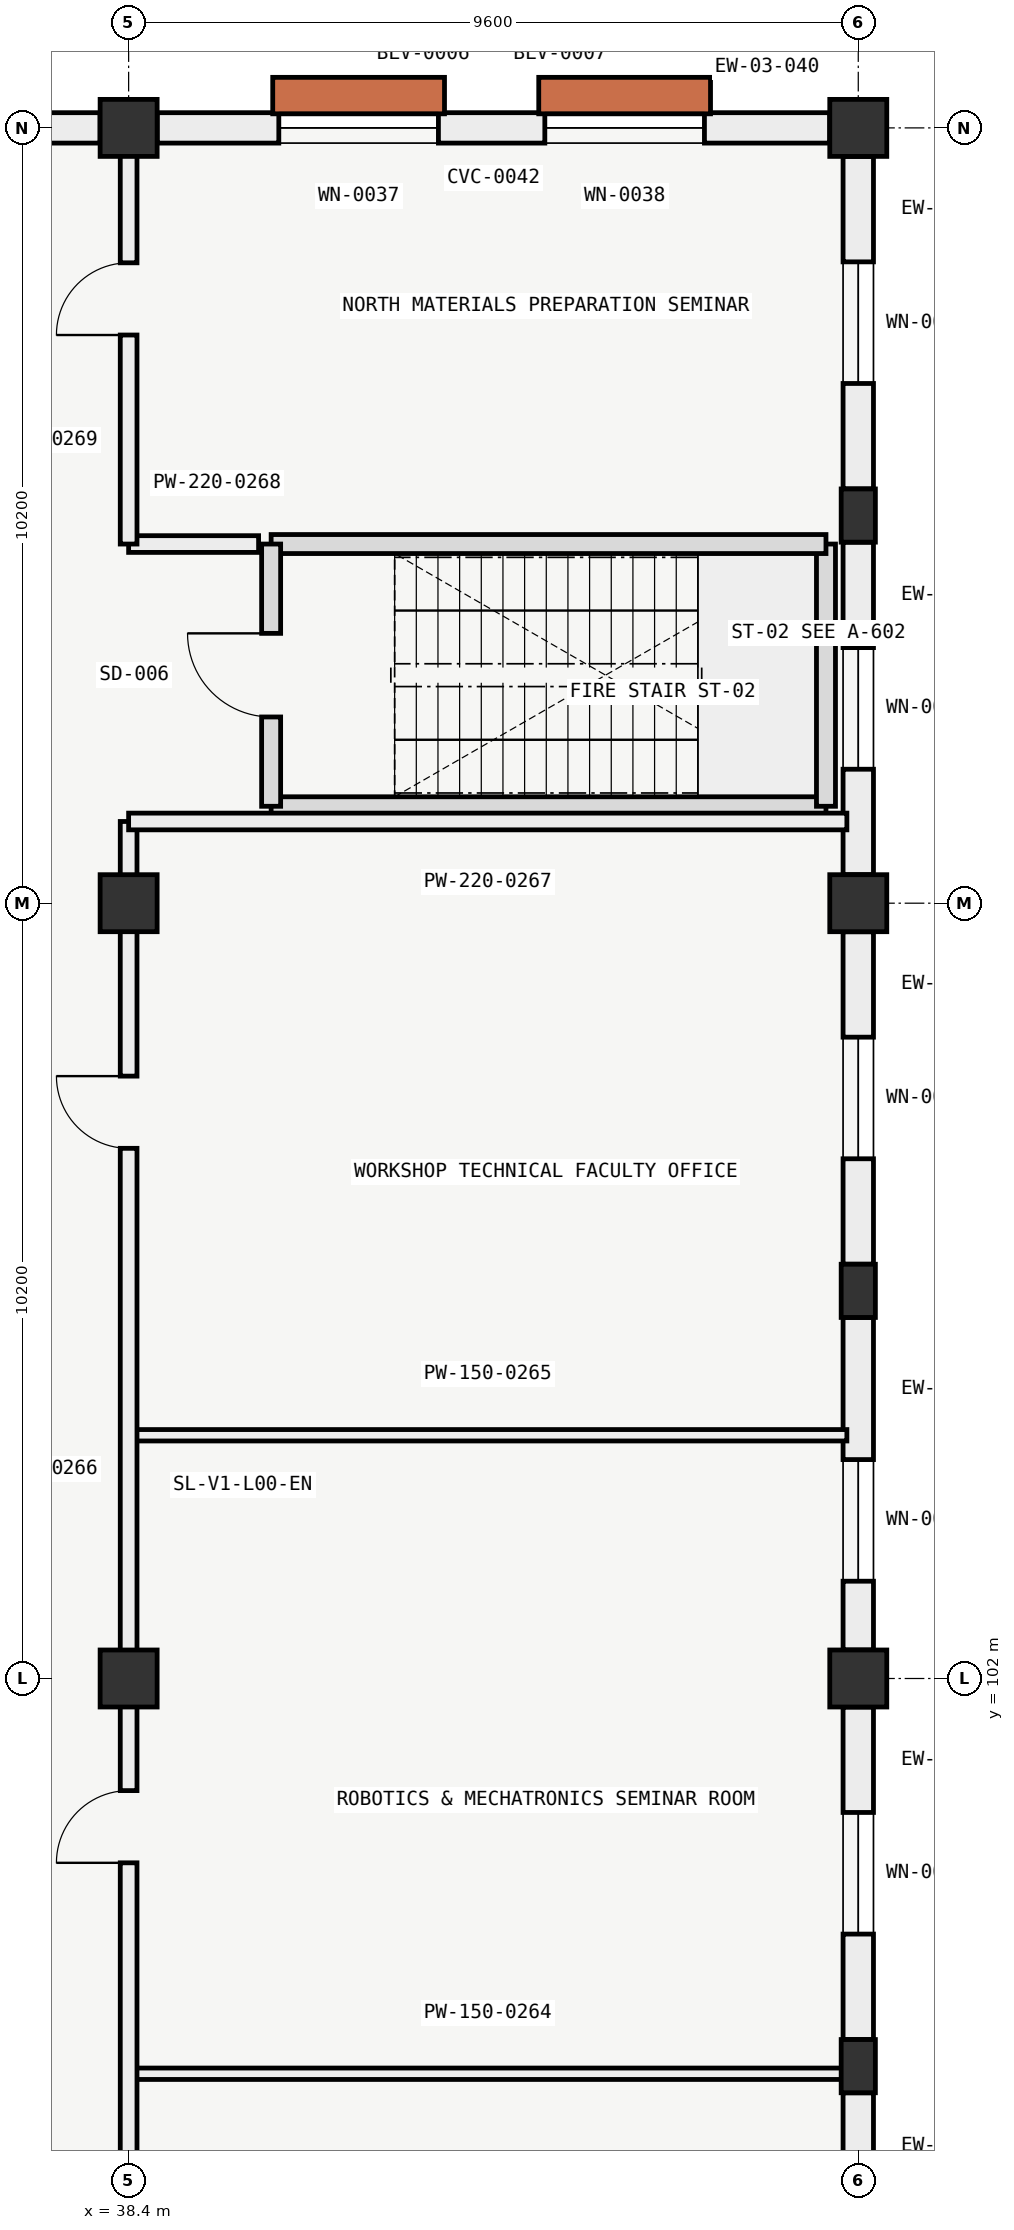
"""IFC4 building model, lengths in metres.
Left out: names, types, materials, properties, quantities, classifications, styles, units other than length and angle.
Written with IfcOpenShell. Run it as: python <this file> out.ifc"""

import sys

from ifc_helpers import new_model, si_unit, direction, frame, frame_2d, origin, origin_2d, place, context, subcontext, project, spatial, rectangle, extrude, element, fill, save


model = new_model("IFC4")
c1 = context("Model", 3, precision=1e-05, world=origin(), true_north=direction((0.0, 1.0)))
c2 = subcontext(c1, "Body", "Model", "MODEL_VIEW")
j1 = project(units=[si_unit("LENGTHUNIT", "METRE"), si_unit("PLANEANGLEUNIT", "RADIAN")], contexts=[c1])
p1 = place(None, origin())
s1 = spatial("IfcSite", under=j1, at=p1, CompositionType="ELEMENT")
p2 = place(p1, origin())
s2 = spatial("IfcBuilding", under=s1, at=p2, CompositionType="ELEMENT")
p3 = place(p2, origin())
s3 = spatial("IfcBuildingStorey", under=s2, at=p3, CompositionType="ELEMENT", Elevation=0.0)
for number, where, z_axis, x_axis in (
    (1, (38.4, 102.0, 0.0), (0.0, 0.0, 1.0), (1.0, 0.0, 0.0)),
    (2, (48.0, 102.0, 0.0), (0.0, 0.0, 1.0), (1.0, 0.0, 0.0)),
    (3, (38.4, 112.2, 0.0), (0.0, 0.0, 1.0), (1.0, 0.0, 0.0)),
    (4, (48.0, 112.2, 0.0), (0.0, 0.0, 1.0), (1.0, 0.0, 0.0)),
    (5, (38.4, 122.4, 0.0), (0.0, 0.0, 1.0), (1.0, 0.0, 0.0)),
    (6, (48.0, 122.4, 0.0), (0.0, 0.0, 1.0), (1.0, 0.0, 0.0)),
):
    element("IfcColumn", number, at=place(p3, frame(where, z_axis=z_axis, x_axis=x_axis)), inside=s3, PredefinedType="COLUMN", context=c2, shape_type="SweptSolid", body=[
        extrude(rectangle(XDim=0.75, YDim=0.75, at=origin_2d()), origin(), (0.0, 0.0, 1.0), 5.4),
    ])
for number, where, z_axis, x_axis in (
    (7, (48.0, 96.9, 0.0), (0.0, 0.0, 1.0), (1.0, 0.0, 0.0)),
    (8, (48.0, 107.1, 0.0), (0.0, 0.0, 1.0), (1.0, 0.0, 0.0)),
    (9, (48.0, 117.3, 0.0), (0.0, 0.0, 1.0), (1.0, 0.0, 0.0)),
):
    element("IfcColumn", number, at=place(p3, frame(where, z_axis=z_axis, x_axis=x_axis)), inside=s3, PredefinedType="PILASTER", context=c2, shape_type="SweptSolid", body=[
        extrude(rectangle(XDim=0.45, YDim=0.7, at=origin_2d()), origin(), (0.0, 0.0, 1.0), 5.4),
    ])
p4 = place(p3, frame((48.0, 96.549, 0.0), z_axis=(0.0, 0.0, 1.0), x_axis=(0.0, -1.0, 0.0)))
e10 = element("IfcWall", 10, at=p4, inside=s3, PredefinedType="SOLIDWALL", context=c2, shape_type="SweptSolid", body=[
    extrude(rectangle(XDim=4.373, YDim=0.4, at=frame_2d((2.187, 0.0))), origin(), (0.0, 0.0, 1.0), 4.45),
])
p5 = place(p4, frame((1.386, 0.0, 0.95)))
e11 = element("IfcOpeningElement", 11, at=p5, cuts=e10, PredefinedType="OPENING", context=c2, shape_type="SweptSolid", body=[
    extrude(rectangle(XDim=1.6, YDim=1.9, at=frame_2d((0.8, 0.95))), frame((0.0, 0.21, 0.0), z_axis=(0.0, -1.0, 0.0), x_axis=(1.0, 0.0, 0.0)), (0.0, 0.0, 1.0), 0.42),
])
p6 = place(p3, frame((48.0, 101.624, 0.0), z_axis=(0.0, 0.0, 1.0), x_axis=(0.0, -1.0, 0.0)))
e12 = element("IfcWall", 12, at=p6, inside=s3, PredefinedType="SOLIDWALL", context=c2, shape_type="SweptSolid", body=[
    extrude(rectangle(XDim=4.373, YDim=0.4, at=frame_2d((2.187, 0.0))), origin(), (0.0, 0.0, 1.0), 4.45),
])
p7 = place(p6, frame((1.386, 0.0, 0.95)))
e13 = element("IfcOpeningElement", 13, at=p7, cuts=e12, PredefinedType="OPENING", context=c2, shape_type="SweptSolid", body=[
    extrude(rectangle(XDim=1.6, YDim=1.9, at=frame_2d((0.8, 0.95))), frame((0.0, 0.21, 0.0), z_axis=(0.0, -1.0, 0.0), x_axis=(1.0, 0.0, 0.0)), (0.0, 0.0, 1.0), 0.42),
])
p8 = place(p3, frame((48.0, 106.749, 0.0), z_axis=(0.0, 0.0, 1.0), x_axis=(0.0, -1.0, 0.0)))
e14 = element("IfcWall", 14, at=p8, inside=s3, PredefinedType="SOLIDWALL", context=c2, shape_type="SweptSolid", body=[
    extrude(rectangle(XDim=4.373, YDim=0.4, at=frame_2d((2.187, 0.0))), origin(), (0.0, 0.0, 1.0), 4.45),
])
p9 = place(p8, frame((1.869, 0.0, 0.95)))
e15 = element("IfcOpeningElement", 15, at=p9, cuts=e14, PredefinedType="OPENING", context=c2, shape_type="SweptSolid", body=[
    extrude(rectangle(XDim=1.6, YDim=1.9, at=frame_2d((0.8, 0.95))), frame((0.0, 0.21, 0.0), z_axis=(0.0, -1.0, 0.0), x_axis=(1.0, 0.0, 0.0)), (0.0, 0.0, 1.0), 0.42),
])
p10 = place(p3, frame((48.0, 111.824, 0.0), z_axis=(0.0, 0.0, 1.0), x_axis=(0.0, -1.0, 0.0)))
e16 = element("IfcWall", 16, at=p10, inside=s3, PredefinedType="SOLIDWALL", context=c2, shape_type="SweptSolid", body=[
    extrude(rectangle(XDim=4.373, YDim=0.4, at=frame_2d((2.187, 0.0))), origin(), (0.0, 0.0, 1.0), 4.45),
])
p11 = place(p10, frame((1.386, 0.0, 0.95)))
e17 = element("IfcOpeningElement", 17, at=p11, cuts=e16, PredefinedType="OPENING", context=c2, shape_type="SweptSolid", body=[
    extrude(rectangle(XDim=1.6, YDim=1.9, at=frame_2d((0.8, 0.95))), frame((0.0, 0.21, 0.0), z_axis=(0.0, -1.0, 0.0), x_axis=(1.0, 0.0, 0.0)), (0.0, 0.0, 1.0), 0.42),
])
p12 = place(p3, frame((48.0, 116.949, 0.0), z_axis=(0.0, 0.0, 1.0), x_axis=(0.0, -1.0, 0.0)))
e18 = element("IfcWall", 18, at=p12, inside=s3, PredefinedType="SOLIDWALL", context=c2, shape_type="SweptSolid", body=[
    extrude(rectangle(XDim=4.373, YDim=0.4, at=frame_2d((2.187, 0.0))), origin(), (0.0, 0.0, 1.0), 4.45),
])
p13 = place(p12, frame((1.386, 0.0, 0.95)))
e19 = element("IfcOpeningElement", 19, at=p13, cuts=e18, PredefinedType="OPENING", context=c2, shape_type="SweptSolid", body=[
    extrude(rectangle(XDim=1.6, YDim=1.9, at=frame_2d((0.8, 0.95))), frame((0.0, 0.21, 0.0), z_axis=(0.0, -1.0, 0.0), x_axis=(1.0, 0.0, 0.0)), (0.0, 0.0, 1.0), 0.42),
])
p14 = place(p3, frame((48.0, 122.024, 0.0), z_axis=(0.0, 0.0, 1.0), x_axis=(0.0, -1.0, 0.0)))
e20 = element("IfcWall", 20, at=p14, inside=s3, PredefinedType="SOLIDWALL", context=c2, shape_type="SweptSolid", body=[
    extrude(rectangle(XDim=4.373, YDim=0.4, at=frame_2d((2.187, 0.0))), origin(), (0.0, 0.0, 1.0), 4.45),
])
p15 = place(p14, frame((1.386, 0.0, 0.95)))
e21 = element("IfcOpeningElement", 21, at=p15, cuts=e20, PredefinedType="OPENING", context=c2, shape_type="SweptSolid", body=[
    extrude(rectangle(XDim=1.6, YDim=1.9, at=frame_2d((0.8, 0.95))), frame((0.0, 0.21, 0.0), z_axis=(0.0, -1.0, 0.0), x_axis=(1.0, 0.0, 0.0)), (0.0, 0.0, 1.0), 0.42),
])
p16 = place(p3, frame((35.4, 122.4, 0.0), z_axis=(0.0, 0.0, 1.0), x_axis=(1.0, 0.0, 0.0)))
e22 = element("IfcWall", 22, at=p16, inside=s3, PredefinedType="SOLIDWALL", context=c2, shape_type="SweptSolid", body=[
    extrude(rectangle(XDim=2.624, YDim=0.4, at=frame_2d((1.312, 0.0))), origin(), (0.0, 0.0, 1.0), 4.493),
])
p17 = place(p16, frame((0.762, 0.0, 0.0)))
e23 = element("IfcOpeningElement", 23, at=p17, cuts=e22, PredefinedType="OPENING", context=c2, shape_type="SweptSolid", body=[
    extrude(rectangle(XDim=1.1, YDim=2.2, at=frame_2d((0.55, 1.1))), frame((0.0, 0.21, 0.0), z_axis=(0.0, -1.0, 0.0), x_axis=(1.0, 0.0, 0.0)), (0.0, 0.0, 1.0), 0.42),
])
p18 = place(p3, frame((38.776, 122.4, 0.0), z_axis=(0.0, 0.0, 1.0), x_axis=(1.0, 0.0, 0.0)))
e24 = element("IfcWall", 24, at=p18, inside=s3, PredefinedType="SOLIDWALL", context=c2, shape_type="SweptSolid", body=[
    extrude(rectangle(XDim=8.848, YDim=0.4, at=frame_2d((4.424, 0.0))), origin(), (0.0, 0.0, 1.0), 4.5),
])
p19 = place(p18, frame((1.6, 0.0, 0.85)))
e25 = element("IfcOpeningElement", 25, at=p19, cuts=e24, PredefinedType="OPENING", context=c2, shape_type="SweptSolid", body=[
    extrude(rectangle(XDim=2.1, YDim=2.4, at=frame_2d((1.05, 1.2))), frame((0.0, 0.21, 0.0), z_axis=(0.0, -1.0, 0.0), x_axis=(1.0, 0.0, 0.0)), (0.0, 0.0, 1.0), 0.42),
])
p20 = place(p18, frame((5.1, 0.0, 0.85)))
e26 = element("IfcOpeningElement", 26, at=p20, cuts=e24, PredefinedType="OPENING", context=c2, shape_type="SweptSolid", body=[
    extrude(rectangle(XDim=2.1, YDim=2.4, at=frame_2d((1.05, 1.2))), frame((0.0, 0.21, 0.0), z_axis=(0.0, -1.0, 0.0), x_axis=(1.0, 0.0, 0.0)), (0.0, 0.0, 1.0), 0.42),
])
p21 = place(p3, frame((40.275, 113.475, 0.0), z_axis=(0.0, 0.0, 1.0), x_axis=(1.0, 0.0, 0.0)))
e27 = element("IfcWall", 27, at=p21, inside=s3, PredefinedType="SOLIDWALL", context=c2, shape_type="SweptSolid", body=[
    extrude(rectangle(XDim=7.3, YDim=0.25, at=frame_2d((3.65, 0.0))), origin(), (0.0, 0.0, 1.0), 5.12),
])
p22 = place(p3, frame((47.575, 113.475, 0.0), z_axis=(0.0, 0.0, 1.0), x_axis=(0.0, 1.0, 0.0)))
e28 = element("IfcWall", 28, at=p22, inside=s3, PredefinedType="SOLIDWALL", context=c2, shape_type="SweptSolid", body=[
    extrude(rectangle(XDim=3.45, YDim=0.25, at=frame_2d((1.725, 0.0))), origin(), (0.0, 0.0, 1.0), 5.12),
])
p23 = place(p3, frame((47.575, 116.925, 0.0), z_axis=(0.0, 0.0, 1.0), x_axis=(-1.0, 0.0, 0.0)))
e29 = element("IfcWall", 29, at=p23, inside=s3, PredefinedType="SOLIDWALL", context=c2, shape_type="SweptSolid", body=[
    extrude(rectangle(XDim=7.3, YDim=0.25, at=frame_2d((3.65, 0.0))), origin(), (0.0, 0.0, 1.0), 5.12),
])
p24 = place(p3, frame((40.275, 113.475, 0.0), z_axis=(0.0, 0.0, 1.0), x_axis=(0.0, 1.0, 0.0)))
e30 = element("IfcWall", 30, at=p24, inside=s3, PredefinedType="SOLIDWALL", context=c2, shape_type="SweptSolid", body=[
    extrude(rectangle(XDim=3.45, YDim=0.25, at=frame_2d((1.725, 0.0))), origin(), (0.0, 0.0, 1.0), 5.12),
])
p25 = place(p24, frame((1.175, 0.0, 0.0)))
e31 = element("IfcOpeningElement", 31, at=p25, cuts=e30, PredefinedType="OPENING", context=c2, shape_type="SweptSolid", body=[
    extrude(rectangle(XDim=1.1, YDim=2.2, at=frame_2d((0.55, 1.1))), frame((0.0, 0.135, 0.0), z_axis=(0.0, -1.0, 0.0), x_axis=(1.0, 0.0, 0.0)), (0.0, 0.0, 1.0), 0.27),
])
for number, where, z_axis, x_axis in (
    (32, (38.4, 96.8, 0.0), (0.0, 0.0, 1.0), (1.0, 0.0, 0.0)),
    (33, (38.4, 105.2, 0.0), (0.0, 0.0, 1.0), (1.0, 0.0, 0.0)),
):
    element("IfcWall", number, at=place(p3, frame(where, z_axis=z_axis, x_axis=x_axis)), inside=s3, PredefinedType="PARTITIONING", context=c2, shape_type="SweptSolid", body=[
        extrude(rectangle(XDim=9.45, YDim=0.15, at=frame_2d((4.725, 0.0))), origin(), (0.0, 0.0, 1.0), 4.643),
    ])
p26 = place(p3, frame((38.4, 88.375, 0.0), z_axis=(0.0, 0.0, 1.0), x_axis=(0.0, 1.0, 0.0)))
e34 = element("IfcWall", 34, at=p26, inside=s3, PredefinedType="PARTITIONING", context=c2, shape_type="SweptSolid", body=[
    extrude(rectangle(XDim=24.9, YDim=0.22, at=frame_2d((12.45, 0.0))), origin(), (0.0, 0.0, 1.0), 4.493),
])
p27 = place(p26, frame((5.8, 0.0, 0.0)))
e35 = element("IfcOpeningElement", 35, at=p27, cuts=e34, PredefinedType="OPENING", context=c2, shape_type="SweptSolid", body=[
    extrude(rectangle(XDim=0.95, YDim=2.1, at=frame_2d((0.475, 1.05))), frame((0.0, 0.12, 0.0), z_axis=(0.0, -1.0, 0.0), x_axis=(1.0, 0.0, 0.0)), (0.0, 0.0, 1.0), 0.24),
])
p28 = place(p26, frame((11.2, 0.0, 0.0)))
e36 = element("IfcOpeningElement", 36, at=p28, cuts=e34, PredefinedType="OPENING", context=c2, shape_type="SweptSolid", body=[
    extrude(rectangle(XDim=0.95, YDim=2.1, at=frame_2d((0.475, 1.05))), frame((0.0, 0.12, 0.0), z_axis=(0.0, -1.0, 0.0), x_axis=(1.0, 0.0, 0.0)), (0.0, 0.0, 1.0), 0.24),
])
p29 = place(p26, frame((20.6, 0.0, 0.0)))
e37 = element("IfcOpeningElement", 37, at=p29, cuts=e34, PredefinedType="OPENING", context=c2, shape_type="SweptSolid", body=[
    extrude(rectangle(XDim=0.95, YDim=2.1, at=frame_2d((0.475, 1.05))), frame((0.0, 0.12, 0.0), z_axis=(0.0, -1.0, 0.0), x_axis=(1.0, 0.0, 0.0)), (0.0, 0.0, 1.0), 0.24),
])
p30 = place(p3, frame((38.4, 113.275, 0.0), z_axis=(0.0, 0.0, 1.0), x_axis=(1.0, 0.0, 0.0)))
e38 = element("IfcWall", 38, at=p30, inside=s3, PredefinedType="PARTITIONING", context=c2, shape_type="SweptSolid", body=[
    extrude(rectangle(XDim=9.45, YDim=0.22, at=frame_2d((4.725, 0.0))), origin(), (0.0, 0.0, 1.0), 4.45),
])
p31 = place(p3, frame((38.4, 116.925, 0.0), z_axis=(0.0, 0.0, 1.0), x_axis=(1.0, 0.0, 0.0)))
e39 = element("IfcWall", 39, at=p31, inside=s3, PredefinedType="PARTITIONING", context=c2, shape_type="SweptSolid", body=[
    extrude(rectangle(XDim=1.71, YDim=0.22, at=frame_2d((0.855, 0.0))), origin(), (0.0, 0.0, 1.0), 4.643),
])
p32 = place(p3, frame((38.4, 116.925, 0.0), z_axis=(0.0, 0.0, 1.0), x_axis=(0.0, 1.0, 0.0)))
e40 = element("IfcWall", 40, at=p32, inside=s3, PredefinedType="PARTITIONING", context=c2, shape_type="SweptSolid", body=[
    extrude(rectangle(XDim=5.325, YDim=0.22, at=frame_2d((2.663, 0.0))), origin(), (0.0, 0.0, 1.0), 4.643),
])
p33 = place(p32, frame((2.75, 0.0, 0.0)))
e41 = element("IfcOpeningElement", 41, at=p33, cuts=e40, PredefinedType="OPENING", context=c2, shape_type="SweptSolid", body=[
    extrude(rectangle(XDim=0.95, YDim=2.1, at=frame_2d((0.475, 1.05))), frame((0.0, 0.12, 0.0), z_axis=(0.0, -1.0, 0.0), x_axis=(1.0, 0.0, 0.0)), (0.0, 0.0, 1.0), 0.24),
])
p34 = place(p7, origin())
e42 = element("IfcWindow", 42, at=p34, inside=s3, PartitioningType="SINGLE_PANEL", PredefinedType="WINDOW", context=c2, shape_type="SweptSolid", body=[
    extrude(rectangle(XDim=1.6, YDim=1.9, at=frame_2d((0.8, 0.95))), frame((0.0, 0.03, 0.0), z_axis=(0.0, -1.0, 0.0), x_axis=(1.0, 0.0, 0.0)), (0.0, 0.0, 1.0), 0.06),
])
fill(e13, e42)
p35 = place(p9, origin())
e43 = element("IfcWindow", 43, at=p35, inside=s3, PartitioningType="SINGLE_PANEL", PredefinedType="WINDOW", context=c2, shape_type="SweptSolid", body=[
    extrude(rectangle(XDim=1.6, YDim=1.9, at=frame_2d((0.8, 0.95))), frame((0.0, 0.03, 0.0), z_axis=(0.0, -1.0, 0.0), x_axis=(1.0, 0.0, 0.0)), (0.0, 0.0, 1.0), 0.06),
])
fill(e15, e43)
p36 = place(p11, origin())
e44 = element("IfcWindow", 44, at=p36, inside=s3, PartitioningType="SINGLE_PANEL", PredefinedType="WINDOW", context=c2, shape_type="SweptSolid", body=[
    extrude(rectangle(XDim=1.6, YDim=1.9, at=frame_2d((0.8, 0.95))), frame((0.0, 0.03, 0.0), z_axis=(0.0, -1.0, 0.0), x_axis=(1.0, 0.0, 0.0)), (0.0, 0.0, 1.0), 0.06),
])
fill(e17, e44)
p37 = place(p13, origin())
e45 = element("IfcWindow", 45, at=p37, inside=s3, PartitioningType="SINGLE_PANEL", PredefinedType="WINDOW", context=c2, shape_type="SweptSolid", body=[
    extrude(rectangle(XDim=1.6, YDim=1.9, at=frame_2d((0.8, 0.95))), frame((0.0, 0.03, 0.0), z_axis=(0.0, -1.0, 0.0), x_axis=(1.0, 0.0, 0.0)), (0.0, 0.0, 1.0), 0.06),
])
fill(e19, e45)
p38 = place(p15, origin())
e46 = element("IfcWindow", 46, at=p38, inside=s3, PartitioningType="SINGLE_PANEL", PredefinedType="WINDOW", context=c2, shape_type="SweptSolid", body=[
    extrude(rectangle(XDim=1.6, YDim=1.9, at=frame_2d((0.8, 0.95))), frame((0.0, 0.03, 0.0), z_axis=(0.0, -1.0, 0.0), x_axis=(1.0, 0.0, 0.0)), (0.0, 0.0, 1.0), 0.06),
])
fill(e21, e46)
p39 = place(p19, origin())
e47 = element("IfcWindow", 47, at=p39, inside=s3, PartitioningType="SINGLE_PANEL", PredefinedType="WINDOW", context=c2, shape_type="SweptSolid", body=[
    extrude(rectangle(XDim=2.1, YDim=2.4, at=frame_2d((1.05, 1.2))), frame((0.0, 0.03, 0.0), z_axis=(0.0, -1.0, 0.0), x_axis=(1.0, 0.0, 0.0)), (0.0, 0.0, 1.0), 0.06),
])
fill(e25, e47)
p40 = place(p20, origin())
e48 = element("IfcWindow", 48, at=p40, inside=s3, PartitioningType="SINGLE_PANEL", PredefinedType="WINDOW", context=c2, shape_type="SweptSolid", body=[
    extrude(rectangle(XDim=2.1, YDim=2.4, at=frame_2d((1.05, 1.2))), frame((0.0, 0.03, 0.0), z_axis=(0.0, -1.0, 0.0), x_axis=(1.0, 0.0, 0.0)), (0.0, 0.0, 1.0), 0.06),
])
fill(e26, e48)
p41 = place(p25, origin())
e49 = element("IfcDoor", 49, at=p41, inside=s3, OperationType="SINGLE_SWING_RIGHT", PredefinedType="DOOR", context=c2, shape_type="SweptSolid", body=[
    extrude(rectangle(XDim=1.1, YDim=2.2, at=frame_2d((0.55, 1.1))), frame((0.0, 0.025, 0.0), z_axis=(0.0, -1.0, 0.0), x_axis=(1.0, 0.0, 0.0)), (0.0, 0.0, 1.0), 0.05),
])
fill(e31, e49)
p42 = place(p28, origin())
e50 = element("IfcDoor", 50, at=p42, inside=s3, OperationType="SINGLE_SWING_LEFT", PredefinedType="DOOR", context=c2, shape_type="SweptSolid", body=[
    extrude(rectangle(XDim=0.95, YDim=2.1, at=frame_2d((0.475, 1.05))), frame((0.0, 0.025, 0.0), z_axis=(0.0, -1.0, 0.0), x_axis=(1.0, 0.0, 0.0)), (0.0, 0.0, 1.0), 0.05),
])
fill(e36, e50)
p43 = place(p29, origin())
e51 = element("IfcDoor", 51, at=p43, inside=s3, OperationType="SINGLE_SWING_RIGHT", PredefinedType="DOOR", context=c2, shape_type="SweptSolid", body=[
    extrude(rectangle(XDim=0.95, YDim=2.1, at=frame_2d((0.475, 1.05))), frame((0.0, 0.025, 0.0), z_axis=(0.0, -1.0, 0.0), x_axis=(1.0, 0.0, 0.0)), (0.0, 0.0, 1.0), 0.05),
])
fill(e37, e51)
p44 = place(p33, origin())
e52 = element("IfcDoor", 52, at=p44, inside=s3, OperationType="SINGLE_SWING_LEFT", PredefinedType="DOOR", context=c2, shape_type="SweptSolid", body=[
    extrude(rectangle(XDim=0.95, YDim=2.1, at=frame_2d((0.475, 1.05))), frame((0.0, 0.025, 0.0), z_axis=(0.0, -1.0, 0.0), x_axis=(1.0, 0.0, 0.0)), (0.0, 0.0, 1.0), 0.05),
])
fill(e41, e52)
save(model, sys.argv[1])
